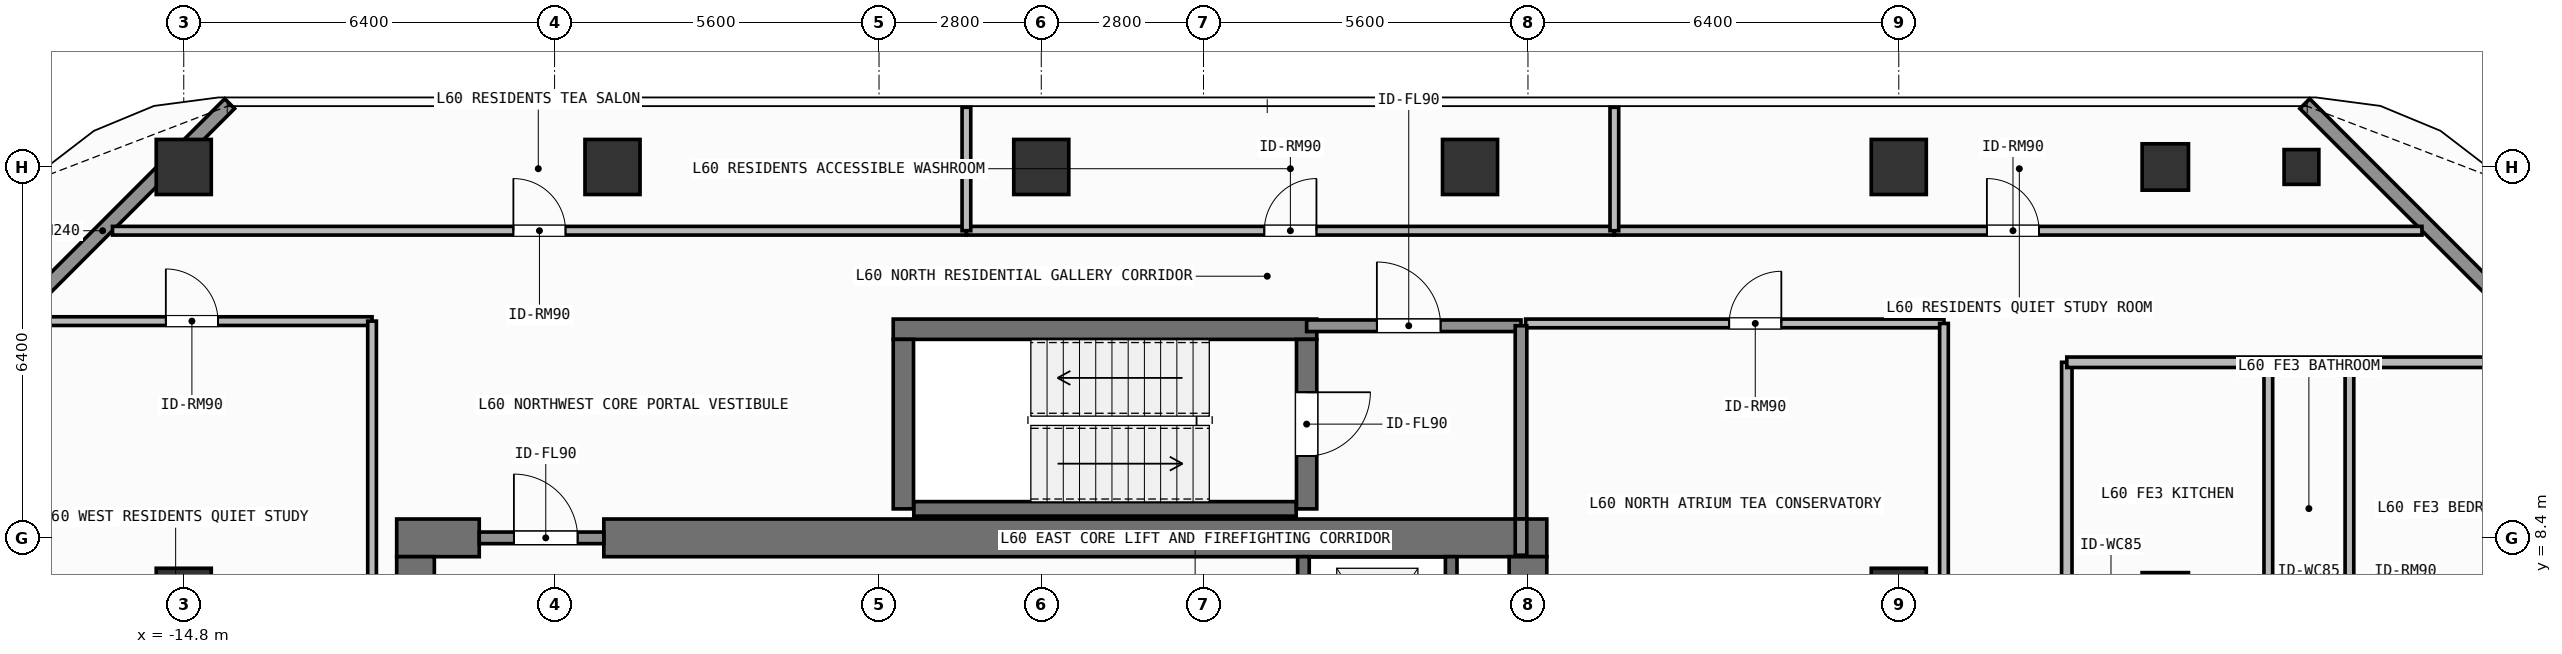
"""IFC4 building model, lengths in metres.
Left out: names, types, materials, properties, quantities, classifications, styles, units other than length and angle.
Written with IfcOpenShell. Run it as: python <this file> out.ifc"""

import sys

from ifc_helpers import new_model, si_unit, direction, frame, frame_2d, origin, origin_2d, place, context, subcontext, project, spatial, rectangle, hollow_rectangle, extrude, element, fill, save


model = new_model("IFC4")
c1 = context("Model", 3, precision=1e-05, world=origin(), true_north=direction((0.0, 1.0)))
c2 = subcontext(c1, "Body", "Model", "MODEL_VIEW")
j1 = project(units=[si_unit("LENGTHUNIT", "METRE"), si_unit("PLANEANGLEUNIT", "RADIAN")], contexts=[c1])
p1 = place(None, origin())
s1 = spatial("IfcSite", under=j1, at=p1, CompositionType="ELEMENT")
p2 = place(p1, origin())
s2 = spatial("IfcBuilding", under=s1, at=p2, CompositionType="ELEMENT")
p3 = place(p2, frame((0.0, 0.0, 246.9)))
s3 = spatial("IfcBuildingStorey", under=s2, at=p3, CompositionType="ELEMENT", Elevation=246.9)
p4 = place(p3, frame((-11.125, 8.4, 0.0), z_axis=(0.0, 0.0, 1.0), x_axis=(1.0, 0.0, 0.0)))
e1 = element("IfcWall", 1, at=p4, inside=s3, PredefinedType="SHEAR", context=c2, shape_type="SweptSolid", body=[
    extrude(rectangle(XDim=1.425, YDim=0.65, at=frame_2d((0.712, 0.0))), origin(), (0.0, 0.0, 1.0), 3.9),
])
p5 = place(p3, frame((-7.55, 8.4, 0.0), z_axis=(0.0, 0.0, 1.0), x_axis=(1.0, 0.0, 0.0)))
e2 = element("IfcWall", 2, at=p5, inside=s3, PredefinedType="SHEAR", context=c2, shape_type="SweptSolid", body=[
    extrude(rectangle(XDim=16.275, YDim=0.65, at=frame_2d((8.138, 0.0))), origin(), (0.0, 0.0, 1.0), 3.9),
])
p6 = place(p3, frame((-10.8, -8.075, 0.0), z_axis=(0.0, 0.0, 1.0), x_axis=(0.0, 1.0, 0.0)))
e3 = element("IfcWall", 3, at=p6, inside=s3, PredefinedType="SHEAR", context=c2, shape_type="SweptSolid", body=[
    extrude(rectangle(XDim=16.15, YDim=0.65, at=frame_2d((8.075, 0.0))), origin(), (0.0, 0.0, 1.0), 3.9),
])
p7 = place(p3, frame((8.4, 5.825, 0.0), z_axis=(0.0, 0.0, 1.0), x_axis=(0.0, 1.0, 0.0)))
e4 = element("IfcWall", 4, at=p7, inside=s3, PredefinedType="SHEAR", context=c2, shape_type="SweptSolid", body=[
    extrude(rectangle(XDim=2.25, YDim=0.65, at=frame_2d((1.125, 0.0))), origin(), (0.0, 0.0, 1.0), 3.9),
])
p8 = place(p3, frame((-2.555, 12.0, 0.0), z_axis=(0.0, 0.0, 1.0), x_axis=(1.0, 0.0, 0.0)))
e5 = element("IfcWall", 5, at=p8, inside=s3, PredefinedType="SHEAR", context=c2, shape_type="SweptSolid", body=[
    extrude(rectangle(XDim=7.31, YDim=0.35, at=frame_2d((3.655, 0.0))), origin(), (0.0, 0.0, 1.0), 3.9),
])
p9 = place(p3, frame((-2.2, 8.9, 0.0), z_axis=(0.0, 0.0, 1.0), x_axis=(1.0, 0.0, 0.0)))
e6 = element("IfcWall", 6, at=p9, inside=s3, PredefinedType="SHEAR", context=c2, shape_type="SweptSolid", body=[
    extrude(rectangle(XDim=6.6, YDim=0.25, at=frame_2d((3.3, 0.0))), origin(), (0.0, 0.0, 1.0), 3.9),
])
p10 = place(p3, frame((-2.38, 8.9, 0.0), z_axis=(0.0, 0.0, 1.0), x_axis=(0.0, 1.0, 0.0)))
e7 = element("IfcWall", 7, at=p10, inside=s3, PredefinedType="SHEAR", context=c2, shape_type="SweptSolid", body=[
    extrude(rectangle(XDim=2.925, YDim=0.35, at=frame_2d((1.462, 0.0))), origin(), (0.0, 0.0, 1.0), 3.9),
])
p11 = place(p3, frame((4.58, 11.825, 0.0), z_axis=(0.0, 0.0, 1.0), x_axis=(0.0, -1.0, 0.0)))
e8 = element("IfcWall", 8, at=p11, inside=s3, PredefinedType="SHEAR", context=c2, shape_type="SweptSolid", body=[
    extrude(rectangle(XDim=2.925, YDim=0.35, at=frame_2d((1.462, 0.0))), origin(), (0.0, 0.0, 1.0), 3.9),
])
p12 = place(p11, frame((0.913, 0.0, 0.0)))
e9 = element("IfcOpeningElement", 9, at=p12, cuts=e8, PredefinedType="OPENING", context=c2, shape_type="SweptSolid", body=[
    extrude(rectangle(XDim=1.1, YDim=2.15, at=frame_2d((0.55, 1.075))), frame((0.0, 0.185, 0.0), z_axis=(0.0, -1.0, 0.0), x_axis=(1.0, 0.0, 0.0)), (0.0, 0.0, 1.0), 0.37),
])
for number, where, z_axis, x_axis in (
    (10, (-14.8, 14.8, 0.0), (0.0, 0.0, 1.0), (1.0, 0.0, 0.0)),
    (11, (-7.4, 14.8, 0.0), (0.0, 0.0, 1.0), (1.0, 0.0, 0.0)),
    (12, (0.0, 14.8, 0.0), (0.0, 0.0, 1.0), (1.0, 0.0, 0.0)),
    (13, (7.4, 14.8, 0.0), (0.0, 0.0, 1.0), (1.0, 0.0, 0.0)),
    (14, (14.8, 14.8, 0.0), (0.0, 0.0, 1.0), (1.0, 0.0, 0.0)),
    (15, (-14.8, 7.4, 0.0), (0.0, 0.0, 1.0), (1.0, 0.0, 0.0)),
    (16, (14.8, 7.4, 0.0), (0.0, 0.0, 1.0), (1.0, 0.0, 0.0)),
):
    element("IfcColumn", number, at=place(p3, frame(where, z_axis=z_axis, x_axis=x_axis)), inside=s3, PredefinedType="COLUMN", context=c2, shape_type="SweptSolid", body=[
        extrude(rectangle(XDim=0.95, YDim=0.95, at=origin_2d()), origin(), (0.0, 0.0, 1.0), 3.9),
    ])
for number, where, z_axis, x_axis in (
    (17, (19.4, 7.4, 0.0), (0.0, 0.0, 1.0), (1.0, 0.0, 0.0)),
    (18, (19.4, 14.8, 0.0), (0.0, 0.0, 1.0), (1.0, 0.0, 0.0)),
):
    element("IfcColumn", number, at=place(p3, frame(where, z_axis=z_axis, x_axis=x_axis)), inside=s3, PredefinedType="COLUMN", context=c2, shape_type="SweptSolid", body=[
        extrude(hollow_rectangle(XDim=0.8, YDim=0.8, WallThickness=0.036, at=origin_2d()), origin(), (0.0, 0.0, 1.0), 3.9),
    ])
p13 = place(p3, frame((21.75, 14.8, 0.0), z_axis=(0.0, 0.0, 1.0), x_axis=(1.0, 0.0, 0.0)))
e19 = element("IfcColumn", 19, at=p13, inside=s3, PredefinedType="COLUMN", context=c2, shape_type="SweptSolid", body=[
    extrude(hollow_rectangle(XDim=0.6, YDim=0.6, WallThickness=0.028, at=origin_2d()), origin(), (0.0, 0.0, 1.0), 3.9),
])
for number, where, z_axis, x_axis in (
    (20, (-18.392, 11.508, 0.0), (0.0, 0.0, 1.0), (0.707, 0.707, 0.0)),
    (21, (21.808, 15.892, 0.0), (0.0, 0.0, 1.0), (0.707, -0.707, 0.0)),
):
    element("IfcWall", number, at=place(p3, frame(where, z_axis=z_axis, x_axis=x_axis)), inside=s3, PredefinedType="SOLIDWALL", context=c2, shape_type="SweptSolid", body=[
        extrude(rectangle(XDim=6.201, YDim=0.24, at=frame_2d((3.101, 0.0))), origin(), (0.0, 0.0, 1.0), 3.68),
    ])
p14 = place(p3, frame((4.525, 5.825, 0.0), z_axis=(0.0, 0.0, 1.0), x_axis=(0.0, 1.0, 0.0)))
e22 = element("IfcWall", 22, at=p14, inside=s3, PredefinedType="SHEAR", context=c2, shape_type="SweptSolid", body=[
    extrude(rectangle(XDim=2.25, YDim=0.2, at=frame_2d((1.125, 0.0))), origin(), (0.0, 0.0, 1.0), 3.68),
])
p15 = place(p14, frame((0.425, 0.0, 0.0)))
e23 = element("IfcOpeningElement", 23, at=p15, cuts=e22, PredefinedType="OPENING", context=c2, shape_type="SweptSolid", body=[
    extrude(rectangle(XDim=1.1, YDim=2.2, at=frame_2d((0.55, 1.1))), frame((0.0, 0.11, 0.0), z_axis=(0.0, -1.0, 0.0), x_axis=(1.0, 0.0, 0.0)), (0.0, 0.0, 1.0), 0.22),
])
p16 = place(p3, frame((7.075, 5.825, 0.0), z_axis=(0.0, 0.0, 1.0), x_axis=(0.0, 1.0, 0.0)))
e24 = element("IfcWall", 24, at=p16, inside=s3, PredefinedType="SHEAR", context=c2, shape_type="SweptSolid", body=[
    extrude(rectangle(XDim=2.25, YDim=0.2, at=frame_2d((1.125, 0.0))), origin(), (0.0, 0.0, 1.0), 3.68),
])
p17 = place(p3, frame((4.58, 12.06, 0.0), z_axis=(0.0, 0.0, 1.0), x_axis=(1.0, 0.0, 0.0)))
e25 = element("IfcWall", 25, at=p17, inside=s3, PredefinedType="SOLIDWALL", context=c2, shape_type="SweptSolid", body=[
    extrude(rectangle(XDim=3.7, YDim=0.2, at=frame_2d((1.85, 0.0))), origin(), (0.0, 0.0, 1.0), 3.68),
])
p18 = place(p17, frame((1.212, 0.0, 0.0)))
e26 = element("IfcOpeningElement", 26, at=p18, cuts=e25, PredefinedType="OPENING", context=c2, shape_type="SweptSolid", body=[
    extrude(rectangle(XDim=1.1, YDim=2.15, at=frame_2d((0.55, 1.075))), frame((0.0, 0.11, 0.0), z_axis=(0.0, -1.0, 0.0), x_axis=(1.0, 0.0, 0.0)), (0.0, 0.0, 1.0), 0.22),
])
p19 = place(p3, frame((-9.7, 8.4, 0.0), z_axis=(0.0, 0.0, 1.0), x_axis=(1.0, 0.0, 0.0)))
e27 = element("IfcWall", 27, at=p19, inside=s3, PredefinedType="SOLIDWALL", context=c2, shape_type="SweptSolid", body=[
    extrude(rectangle(XDim=2.15, YDim=0.2, at=frame_2d((1.075, 0.0))), origin(), (0.0, 0.0, 1.0), 2.92),
])
p20 = place(p19, frame((0.598, 0.0, 0.0)))
e28 = element("IfcOpeningElement", 28, at=p20, cuts=e27, PredefinedType="OPENING", context=c2, shape_type="SweptSolid", body=[
    extrude(rectangle(XDim=1.1, YDim=2.15, at=frame_2d((0.55, 1.075))), frame((0.0, 0.11, 0.0), z_axis=(0.0, -1.0, 0.0), x_axis=(1.0, 0.0, 0.0)), (0.0, 0.0, 1.0), 0.22),
])
p21 = place(p3, frame((8.36, 12.1, 0.0), z_axis=(0.0, 0.0, 1.0), x_axis=(1.0, 0.0, 0.0)))
e29 = element("IfcWall", 29, at=p21, inside=s3, PredefinedType="PARTITIONING", context=c2, shape_type="SweptSolid", body=[
    extrude(rectangle(XDim=7.22, YDim=0.15, at=frame_2d((3.61, 0.0))), origin(), (0.0, 0.0, 1.0), 3.68),
])
p22 = place(p21, frame((3.513, 0.0, 0.0)))
e30 = element("IfcOpeningElement", 30, at=p22, cuts=e29, PredefinedType="OPENING", context=c2, shape_type="SweptSolid", body=[
    extrude(rectangle(XDim=0.9, YDim=2.1, at=frame_2d((0.45, 1.05))), frame((0.0, 0.085, 0.0), z_axis=(0.0, -1.0, 0.0), x_axis=(1.0, 0.0, 0.0)), (0.0, 0.0, 1.0), 0.17),
])
p23 = place(p3, frame((-16.03, 13.7, 0.0), z_axis=(0.0, 0.0, 1.0), x_axis=(1.0, 0.0, 0.0)))
e31 = element("IfcWall", 31, at=p23, inside=s3, PredefinedType="PARTITIONING", context=c2, shape_type="SweptSolid", body=[
    extrude(rectangle(XDim=14.738, YDim=0.15, at=frame_2d((7.369, 0.0))), origin(), (0.0, 0.0, 1.0), 3.68),
])
p24 = place(p23, frame((6.919, 0.0, 0.0)))
e32 = element("IfcOpeningElement", 32, at=p24, cuts=e31, PredefinedType="OPENING", context=c2, shape_type="SweptSolid", body=[
    extrude(rectangle(XDim=0.9, YDim=2.1, at=frame_2d((0.45, 1.05))), frame((0.0, 0.085, 0.0), z_axis=(0.0, -1.0, 0.0), x_axis=(1.0, 0.0, 0.0)), (0.0, 0.0, 1.0), 0.17),
])
p25 = place(p3, frame((-1.292, 13.7, 0.0), z_axis=(0.0, 0.0, 1.0), x_axis=(1.0, 0.0, 0.0)))
e33 = element("IfcWall", 33, at=p25, inside=s3, PredefinedType="PARTITIONING", context=c2, shape_type="SweptSolid", body=[
    extrude(rectangle(XDim=11.183, YDim=0.15, at=frame_2d((5.592, 0.0))), origin(), (0.0, 0.0, 1.0), 3.68),
])
p26 = place(p25, frame((5.142, 0.0, 0.0)))
e34 = element("IfcOpeningElement", 34, at=p26, cuts=e33, PredefinedType="OPENING", context=c2, shape_type="SweptSolid", body=[
    extrude(rectangle(XDim=0.9, YDim=2.1, at=frame_2d((0.45, 1.05))), frame((0.0, 0.085, 0.0), z_axis=(0.0, -1.0, 0.0), x_axis=(1.0, 0.0, 0.0)), (0.0, 0.0, 1.0), 0.17),
])
p27 = place(p3, frame((9.891, 13.7, 0.0), z_axis=(0.0, 0.0, 1.0), x_axis=(1.0, 0.0, 0.0)))
e35 = element("IfcWall", 35, at=p27, inside=s3, PredefinedType="PARTITIONING", context=c2, shape_type="SweptSolid", body=[
    extrude(rectangle(XDim=13.939, YDim=0.15, at=frame_2d((6.969, 0.0))), origin(), (0.0, 0.0, 1.0), 3.68),
])
p28 = place(p27, frame((6.43, 0.0, 0.0)))
e36 = element("IfcOpeningElement", 36, at=p28, cuts=e35, PredefinedType="OPENING", context=c2, shape_type="SweptSolid", body=[
    extrude(rectangle(XDim=0.9, YDim=2.1, at=frame_2d((0.45, 1.05))), frame((0.0, 0.085, 0.0), z_axis=(0.0, -1.0, 0.0), x_axis=(1.0, 0.0, 0.0)), (0.0, 0.0, 1.0), 0.17),
])
p29 = place(p3, frame((-17.59, 12.14, 0.0), z_axis=(0.0, 0.0, 1.0), x_axis=(1.0, 0.0, 0.0)))
e37 = element("IfcWall", 37, at=p29, inside=s3, PredefinedType="PARTITIONING", context=c2, shape_type="SweptSolid", body=[
    extrude(rectangle(XDim=6.04, YDim=0.15, at=frame_2d((3.02, 0.0))), origin(), (0.0, 0.0, 1.0), 3.68),
])
p30 = place(p29, frame((2.481, 0.0, 0.0)))
e38 = element("IfcOpeningElement", 38, at=p30, cuts=e37, PredefinedType="OPENING", context=c2, shape_type="SweptSolid", body=[
    extrude(rectangle(XDim=0.9, YDim=2.1, at=frame_2d((0.45, 1.05))), frame((0.0, 0.085, 0.0), z_axis=(0.0, -1.0, 0.0), x_axis=(1.0, 0.0, 0.0)), (0.0, 0.0, 1.0), 0.17),
])
p31 = place(p3, frame((17.7, 3.58, 0.0), z_axis=(0.0, 0.0, 1.0), x_axis=(0.0, 1.0, 0.0)))
e39 = element("IfcWall", 39, at=p31, inside=s3, PredefinedType="PARTITIONING", context=c2, shape_type="SweptSolid", body=[
    extrude(rectangle(XDim=7.85, YDim=0.18, at=frame_2d((3.925, 0.0))), origin(), (0.0, 0.0, 1.0), 3.68),
])
p32 = place(p31, frame((1.396, 0.0, 0.0)))
e40 = element("IfcOpeningElement", 40, at=p32, cuts=e39, PredefinedType="OPENING", context=c2, shape_type="SweptSolid", body=[
    extrude(rectangle(XDim=1.0, YDim=2.2, at=frame_2d((0.5, 1.1))), frame((0.0, 0.1, 0.0), z_axis=(0.0, -1.0, 0.0), x_axis=(1.0, 0.0, 0.0)), (0.0, 0.0, 1.0), 0.2),
])
p33 = place(p3, frame((8.28, 8.725, 0.0), z_axis=(0.0, 0.0, 1.0), x_axis=(0.0, 1.0, 0.0)))
e41 = element("IfcWall", 41, at=p33, inside=s3, PredefinedType="SOLIDWALL", context=c2, shape_type="SweptSolid", body=[
    extrude(rectangle(XDim=3.335, YDim=0.2, at=frame_2d((1.667, 0.0))), origin(), (0.0, 0.0, 1.0), 3.68),
])
p34 = place(p3, frame((8.28, 8.1, 0.0), z_axis=(0.0, 0.0, 1.0), x_axis=(0.0, 1.0, 0.0)))
e42 = element("IfcWall", 42, at=p34, inside=s3, PredefinedType="SOLIDWALL", context=c2, shape_type="SweptSolid", body=[
    extrude(rectangle(XDim=0.625, YDim=0.2, at=frame_2d((0.312, 0.0))), origin(), (0.0, 0.0, 1.0), 3.68),
])
p35 = place(p3, frame((15.58, 5.85, 0.0), z_axis=(0.0, 0.0, 1.0), x_axis=(0.0, 1.0, 0.0)))
e43 = element("IfcWall", 43, at=p35, inside=s3, PredefinedType="PARTITIONING", context=c2, shape_type="SweptSolid", body=[
    extrude(rectangle(XDim=6.25, YDim=0.15, at=frame_2d((3.125, 0.0))), origin(), (0.0, 0.0, 1.0), 3.68),
])
for number, where, z_axis, x_axis in (
    (44, (-1.292, 13.7, 0.0), (0.0, 0.0, 1.0), (0.0, 1.0, 0.0)),
    (45, (9.891, 13.7, 0.0), (0.0, 0.0, 1.0), (0.0, 1.0, 0.0)),
):
    element("IfcWall", number, at=place(p3, frame(where, z_axis=z_axis, x_axis=x_axis)), inside=s3, PredefinedType="PARTITIONING", context=c2, shape_type="SweptSolid", body=[
        extrude(rectangle(XDim=2.13, YDim=0.15, at=frame_2d((1.065, 0.0))), origin(), (0.0, 0.0, 1.0), 3.68),
    ])
p36 = place(p3, frame((-11.55, 2.95, 0.0), z_axis=(0.0, 0.0, 1.0), x_axis=(0.0, 1.0, 0.0)))
e46 = element("IfcWall", 46, at=p36, inside=s3, PredefinedType="PARTITIONING", context=c2, shape_type="SweptSolid", body=[
    extrude(rectangle(XDim=9.19, YDim=0.15, at=frame_2d((4.595, 0.0))), origin(), (0.0, 0.0, 1.0), 3.68),
])
for number, where, z_axis, x_axis in (
    (47, (21.178, 6.38, 0.0), (0.0, 0.0, 1.0), (0.0, 1.0, 0.0)),
    (48, (22.578, 6.38, 0.0), (0.0, 0.0, 1.0), (0.0, 1.0, 0.0)),
):
    element("IfcWall", number, at=place(p3, frame(where, z_axis=z_axis, x_axis=x_axis)), inside=s3, PredefinedType="PARTITIONING", context=c2, shape_type="SweptSolid", body=[
        extrude(rectangle(XDim=5.05, YDim=0.15, at=frame_2d((2.525, 0.0))), origin(), (0.0, 0.0, 1.0), 3.68),
    ])
p37 = place(p3, frame((17.7, 11.43, 0.0), z_axis=(0.0, 0.0, 1.0), x_axis=(1.0, 0.0, 0.0)))
e49 = element("IfcWall", 49, at=p37, inside=s3, PredefinedType="PARTITIONING", context=c2, shape_type="SweptSolid", body=[
    extrude(rectangle(XDim=8.43, YDim=0.18, at=frame_2d((4.215, 0.0))), origin(), (0.0, 0.0, 1.0), 3.42),
])
p38 = place(p12, origin())
e50 = element("IfcDoor", 50, at=p38, inside=s3, OperationType="SINGLE_SWING_LEFT", PredefinedType="DOOR", context=c2, shape_type="SweptSolid", body=[
    extrude(rectangle(XDim=1.1, YDim=2.15, at=frame_2d((0.55, 1.075))), frame((0.0, 0.025, 0.0), z_axis=(0.0, -1.0, 0.0), x_axis=(1.0, 0.0, 0.0)), (0.0, 0.0, 1.0), 0.05),
])
fill(e9, e50)
p39 = place(p18, origin())
e51 = element("IfcDoor", 51, at=p39, inside=s3, OperationType="SINGLE_SWING_LEFT", PredefinedType="DOOR", context=c2, shape_type="SweptSolid", body=[
    extrude(rectangle(XDim=1.1, YDim=2.15, at=frame_2d((0.55, 1.075))), frame((0.0, 0.025, 0.0), z_axis=(0.0, -1.0, 0.0), x_axis=(1.0, 0.0, 0.0)), (0.0, 0.0, 1.0), 0.05),
])
fill(e26, e51)
p40 = place(p20, origin())
e52 = element("IfcDoor", 52, at=p40, inside=s3, OperationType="SINGLE_SWING_LEFT", PredefinedType="DOOR", context=c2, shape_type="SweptSolid", body=[
    extrude(rectangle(XDim=1.1, YDim=2.15, at=frame_2d((0.55, 1.075))), frame((0.0, 0.025, 0.0), z_axis=(0.0, -1.0, 0.0), x_axis=(1.0, 0.0, 0.0)), (0.0, 0.0, 1.0), 0.05),
])
fill(e28, e52)
p41 = place(p22, origin())
e53 = element("IfcDoor", 53, at=p41, inside=s3, OperationType="SINGLE_SWING_RIGHT", PredefinedType="DOOR", context=c2, shape_type="SweptSolid", body=[
    extrude(rectangle(XDim=0.9, YDim=2.1, at=frame_2d((0.45, 1.05))), frame((0.0, 0.025, 0.0), z_axis=(0.0, -1.0, 0.0), x_axis=(1.0, 0.0, 0.0)), (0.0, 0.0, 1.0), 0.05),
])
fill(e30, e53)
p42 = place(p24, origin())
e54 = element("IfcDoor", 54, at=p42, inside=s3, OperationType="SINGLE_SWING_LEFT", PredefinedType="DOOR", context=c2, shape_type="SweptSolid", body=[
    extrude(rectangle(XDim=0.9, YDim=2.1, at=frame_2d((0.45, 1.05))), frame((0.0, 0.025, 0.0), z_axis=(0.0, -1.0, 0.0), x_axis=(1.0, 0.0, 0.0)), (0.0, 0.0, 1.0), 0.05),
])
fill(e32, e54)
p43 = place(p26, origin())
e55 = element("IfcDoor", 55, at=p43, inside=s3, OperationType="SINGLE_SWING_RIGHT", PredefinedType="DOOR", context=c2, shape_type="SweptSolid", body=[
    extrude(rectangle(XDim=0.9, YDim=2.1, at=frame_2d((0.45, 1.05))), frame((0.0, 0.025, 0.0), z_axis=(0.0, -1.0, 0.0), x_axis=(1.0, 0.0, 0.0)), (0.0, 0.0, 1.0), 0.05),
])
fill(e34, e55)
p44 = place(p28, origin())
e56 = element("IfcDoor", 56, at=p44, inside=s3, OperationType="SINGLE_SWING_LEFT", PredefinedType="DOOR", context=c2, shape_type="SweptSolid", body=[
    extrude(rectangle(XDim=0.9, YDim=2.1, at=frame_2d((0.45, 1.05))), frame((0.0, 0.025, 0.0), z_axis=(0.0, -1.0, 0.0), x_axis=(1.0, 0.0, 0.0)), (0.0, 0.0, 1.0), 0.05),
])
fill(e36, e56)
p45 = place(p30, origin())
e57 = element("IfcDoor", 57, at=p45, inside=s3, OperationType="SINGLE_SWING_LEFT", PredefinedType="DOOR", context=c2, shape_type="SweptSolid", body=[
    extrude(rectangle(XDim=0.9, YDim=2.1, at=frame_2d((0.45, 1.05))), frame((0.0, 0.025, 0.0), z_axis=(0.0, -1.0, 0.0), x_axis=(1.0, 0.0, 0.0)), (0.0, 0.0, 1.0), 0.05),
])
fill(e38, e57)
save(model, sys.argv[1])
